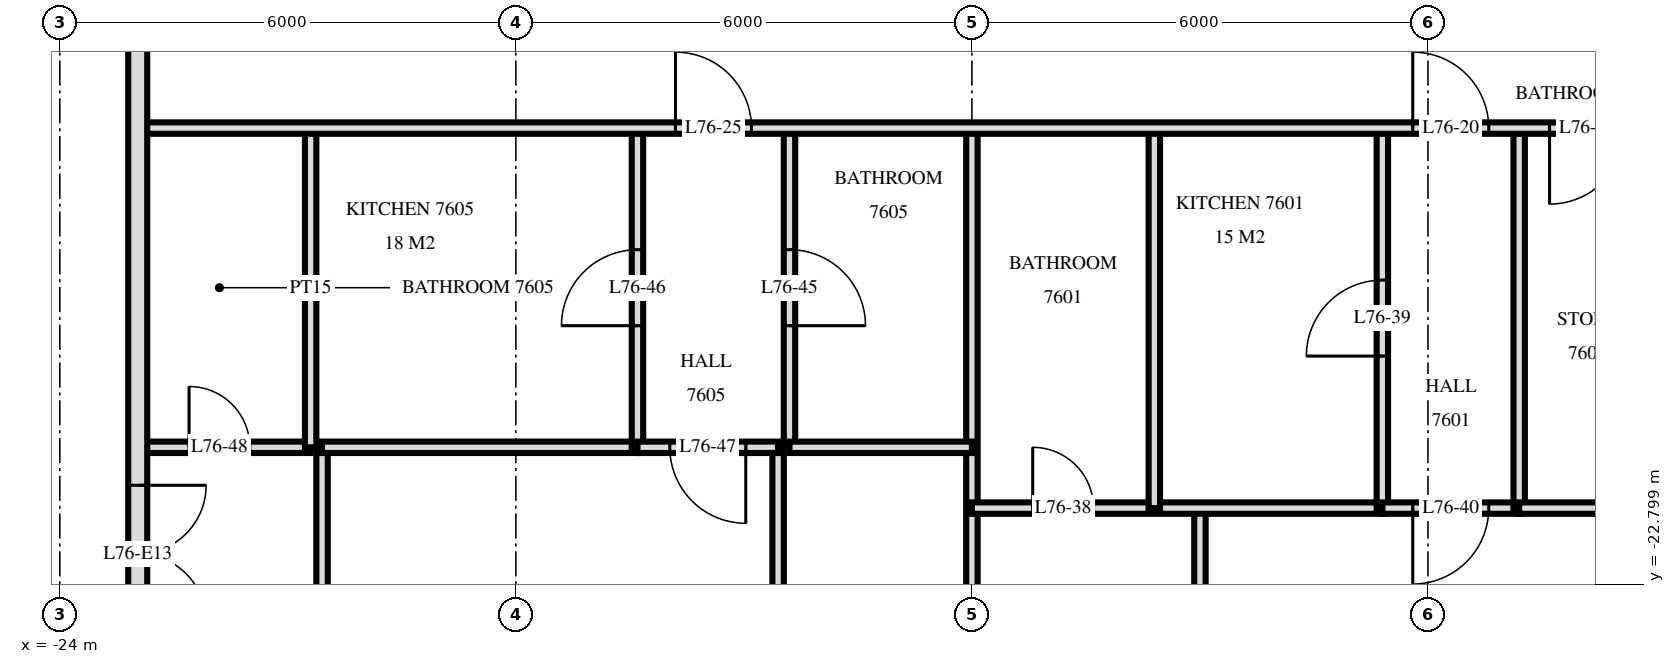
"""IFC4 building model, lengths in metres.
Left out: names, types, materials, properties, quantities, classifications, styles, units other than length and angle.
Written with IfcOpenShell. Run it as: python <this file> out.ifc"""

import sys

from ifc_helpers import new_model, si_unit, direction, frame, frame_2d, origin, place, context, subcontext, project, spatial, rectangle, extrude, element, fill, save


model = new_model("IFC4")
c1 = context("Model", 3, precision=1e-05, world=origin(), true_north=direction((0.0, 1.0)))
c2 = subcontext(c1, "Body", "Model", "MODEL_VIEW")
j1 = project(units=[si_unit("LENGTHUNIT", "METRE"), si_unit("PLANEANGLEUNIT", "RADIAN")], contexts=[c1])
p1 = place(None, origin())
s1 = spatial("IfcSite", under=j1, at=p1, CompositionType="ELEMENT")
p2 = place(p1, origin())
s2 = spatial("IfcBuilding", under=s1, at=p2, CompositionType="ELEMENT")
p3 = place(p2, frame((0.0, 0.0, 287.6)))
s3 = spatial("IfcBuildingStorey", under=s2, at=p3, CompositionType="ELEMENT", Elevation=287.6)
p4 = place(p3, frame((-22.975, -3.325, 0.0), z_axis=(0.0, 0.0, 1.0), x_axis=(0.0, -1.0, 0.0)))
e1 = element("IfcWall", 1, at=p4, inside=s3, PredefinedType="SOLIDWALL", context=c2, shape_type="SweptSolid", body=[
    extrude(rectangle(XDim=25.951, YDim=0.25, at=frame_2d((12.975, 0.0))), origin(), (0.0, 0.0, 1.0), 3.22),
])
p5 = place(p4, frame((1.475, 0.0, 0.0)))
e2 = element("IfcOpeningElement", 2, at=p5, cuts=e1, PredefinedType="OPENING", context=c2, shape_type="SweptSolid", body=[
    extrude(rectangle(XDim=1.8, YDim=2.4, at=frame_2d((0.9, 1.2))), frame((0.0, 0.135, 0.0), z_axis=(0.0, -1.0, 0.0), x_axis=(1.0, 0.0, 0.0)), (0.0, 0.0, 1.0), 0.27),
])
p6 = place(p4, frame((7.975, 0.0, 0.0)))
e3 = element("IfcOpeningElement", 3, at=p6, cuts=e1, PredefinedType="OPENING", context=c2, shape_type="SweptSolid", body=[
    extrude(rectangle(XDim=1.8, YDim=2.4, at=frame_2d((0.9, 1.2))), frame((0.0, 0.135, 0.0), z_axis=(0.0, -1.0, 0.0), x_axis=(1.0, 0.0, 0.0)), (0.0, 0.0, 1.0), 0.27),
])
p7 = place(p4, frame((18.175, 0.0, 0.0)))
e4 = element("IfcOpeningElement", 4, at=p7, cuts=e1, PredefinedType="OPENING", context=c2, shape_type="SweptSolid", body=[
    extrude(rectangle(XDim=1.8, YDim=2.4, at=frame_2d((0.9, 1.2))), frame((0.0, 0.135, 0.0), z_axis=(0.0, -1.0, 0.0), x_axis=(1.0, 0.0, 0.0)), (0.0, 0.0, 1.0), 0.27),
])
p8 = place(p4, frame((21.075, 0.0, 0.0)))
e5 = element("IfcOpeningElement", 5, at=p8, cuts=e1, PredefinedType="OPENING", context=c2, shape_type="SweptSolid", body=[
    extrude(rectangle(XDim=1.8, YDim=2.4, at=frame_2d((0.9, 1.2))), frame((0.0, 0.135, 0.0), z_axis=(0.0, -1.0, 0.0), x_axis=(1.0, 0.0, 0.0)), (0.0, 0.0, 1.0), 0.27),
])
p9 = place(p4, frame((23.825, 0.0, 0.9)))
e6 = element("IfcOpeningElement", 6, at=p9, cuts=e1, PredefinedType="OPENING", context=c2, shape_type="SweptSolid", body=[
    extrude(rectangle(XDim=1.8, YDim=1.5, at=frame_2d((0.9, 0.75))), frame((0.0, 0.135, 0.0), z_axis=(0.0, -1.0, 0.0), x_axis=(1.0, 0.0, 0.0)), (0.0, 0.0, 1.0), 0.27),
])
p10 = place(p3, frame((-4.8, -21.8, 0.0), z_axis=(0.0, 0.0, 1.0), x_axis=(0.0, 1.0, 0.0)))
e7 = element("IfcWall", 7, at=p10, inside=s3, PredefinedType="PARTITIONING", context=c2, shape_type="SweptSolid", body=[
    extrude(rectangle(XDim=5.0, YDim=0.15, at=frame_2d((2.5, 0.0))), origin(), (0.0, 0.0, 1.0), 3.22),
])
p11 = place(p3, frame((-6.6, -21.8, 0.0), z_axis=(0.0, 0.0, 1.0), x_axis=(0.0, 1.0, 0.0)))
e8 = element("IfcWall", 8, at=p11, inside=s3, PredefinedType="PARTITIONING", context=c2, shape_type="SweptSolid", body=[
    extrude(rectangle(XDim=5.0, YDim=0.15, at=frame_2d((2.5, 0.0))), origin(), (0.0, 0.0, 1.0), 3.22),
])
p12 = place(p11, frame((2.0, 0.0, 0.0)))
e9 = element("IfcOpeningElement", 9, at=p12, cuts=e8, PredefinedType="OPENING", context=c2, shape_type="SweptSolid", body=[
    extrude(rectangle(XDim=1.0, YDim=2.1, at=frame_2d((0.5, 1.05))), frame((0.0, 0.085, 0.0), z_axis=(0.0, -1.0, 0.0), x_axis=(1.0, 0.0, 0.0)), (0.0, 0.0, 1.0), 0.17),
])
p13 = place(p3, frame((-9.0, -33.62, 0.0), z_axis=(0.0, 0.0, 1.0), x_axis=(0.0, 1.0, 0.0)))
e10 = element("IfcWall", 10, at=p13, inside=s3, PredefinedType="PARTITIONING", context=c2, shape_type="SweptSolid", body=[
    extrude(rectangle(XDim=11.82, YDim=0.15, at=frame_2d((5.91, 0.0))), origin(), (0.0, 0.0, 1.0), 3.22),
])
p14 = place(p13, frame((5.37, 0.0, 0.0)))
e11 = element("IfcOpeningElement", 11, at=p14, cuts=e10, PredefinedType="OPENING", context=c2, shape_type="SweptSolid", body=[
    extrude(rectangle(XDim=0.9, YDim=2.1, at=frame_2d((0.45, 1.05))), frame((0.0, 0.085, 0.0), z_axis=(0.0, -1.0, 0.0), x_axis=(1.0, 0.0, 0.0)), (0.0, 0.0, 1.0), 0.17),
])
p15 = place(p3, frame((-9.6, -21.8, 0.0), z_axis=(0.0, 0.0, 1.0), x_axis=(0.0, 1.0, 0.0)))
e12 = element("IfcWall", 12, at=p15, inside=s3, PredefinedType="PARTITIONING", context=c2, shape_type="SweptSolid", body=[
    extrude(rectangle(XDim=5.0, YDim=0.15, at=frame_2d((2.5, 0.0))), origin(), (0.0, 0.0, 1.0), 3.22),
])
p16 = place(p3, frame((-12.0, -33.62, 0.0), z_axis=(0.0, 0.0, 1.0), x_axis=(0.0, 1.0, 0.0)))
e13 = element("IfcWall", 13, at=p16, inside=s3, PredefinedType="PARTITIONING", context=c2, shape_type="SweptSolid", body=[
    extrude(rectangle(XDim=16.82, YDim=0.15, at=frame_2d((8.41, 0.0))), origin(), (0.0, 0.0, 1.0), 3.22),
])
p17 = place(p3, frame((-14.4, -21.0, 0.0), z_axis=(0.0, 0.0, 1.0), x_axis=(0.0, 1.0, 0.0)))
e14 = element("IfcWall", 14, at=p17, inside=s3, PredefinedType="PARTITIONING", context=c2, shape_type="SweptSolid", body=[
    extrude(rectangle(XDim=4.2, YDim=0.15, at=frame_2d((2.1, 0.0))), origin(), (0.0, 0.0, 1.0), 3.22),
])
p18 = place(p17, frame((1.6, 0.0, 0.0)))
e15 = element("IfcOpeningElement", 15, at=p18, cuts=e14, PredefinedType="OPENING", context=c2, shape_type="SweptSolid", body=[
    extrude(rectangle(XDim=1.0, YDim=2.1, at=frame_2d((0.5, 1.05))), frame((0.0, 0.085, 0.0), z_axis=(0.0, -1.0, 0.0), x_axis=(1.0, 0.0, 0.0)), (0.0, 0.0, 1.0), 0.17),
])
p19 = place(p3, frame((-14.55, -33.62, 0.0), z_axis=(0.0, 0.0, 1.0), x_axis=(0.0, 1.0, 0.0)))
e16 = element("IfcWall", 16, at=p19, inside=s3, PredefinedType="PARTITIONING", context=c2, shape_type="SweptSolid", body=[
    extrude(rectangle(XDim=12.62, YDim=0.15, at=frame_2d((6.31, 0.0))), origin(), (0.0, 0.0, 1.0), 3.22),
])
p20 = place(p19, frame((5.77, 0.0, 0.0)))
e17 = element("IfcOpeningElement", 17, at=p20, cuts=e16, PredefinedType="OPENING", context=c2, shape_type="SweptSolid", body=[
    extrude(rectangle(XDim=0.9, YDim=2.1, at=frame_2d((0.45, 1.05))), frame((0.0, 0.085, 0.0), z_axis=(0.0, -1.0, 0.0), x_axis=(1.0, 0.0, 0.0)), (0.0, 0.0, 1.0), 0.17),
])
p21 = place(p3, frame((-16.4, -21.0, 0.0), z_axis=(0.0, 0.0, 1.0), x_axis=(0.0, 1.0, 0.0)))
e18 = element("IfcWall", 18, at=p21, inside=s3, PredefinedType="PARTITIONING", context=c2, shape_type="SweptSolid", body=[
    extrude(rectangle(XDim=4.2, YDim=0.15, at=frame_2d((2.1, 0.0))), origin(), (0.0, 0.0, 1.0), 3.22),
])
p22 = place(p21, frame((1.6, 0.0, 0.0)))
e19 = element("IfcOpeningElement", 19, at=p22, cuts=e18, PredefinedType="OPENING", context=c2, shape_type="SweptSolid", body=[
    extrude(rectangle(XDim=1.0, YDim=2.1, at=frame_2d((0.5, 1.05))), frame((0.0, 0.085, 0.0), z_axis=(0.0, -1.0, 0.0), x_axis=(1.0, 0.0, 0.0)), (0.0, 0.0, 1.0), 0.17),
])
p23 = place(p3, frame((-20.55, -33.017, 0.0), z_axis=(0.0, 0.0, 1.0), x_axis=(0.0, 1.0, 0.0)))
e20 = element("IfcWall", 20, at=p23, inside=s3, PredefinedType="PARTITIONING", context=c2, shape_type="SweptSolid", body=[
    extrude(rectangle(XDim=12.017, YDim=0.15, at=frame_2d((6.008, 0.0))), origin(), (0.0, 0.0, 1.0), 3.22),
])
p24 = place(p23, frame((5.432, 0.0, 0.0)))
e21 = element("IfcOpeningElement", 21, at=p24, cuts=e20, PredefinedType="OPENING", context=c2, shape_type="SweptSolid", body=[
    extrude(rectangle(XDim=0.9, YDim=2.1, at=frame_2d((0.45, 1.05))), frame((0.0, 0.085, 0.0), z_axis=(0.0, -1.0, 0.0), x_axis=(1.0, 0.0, 0.0)), (0.0, 0.0, 1.0), 0.17),
])
p25 = place(p3, frame((-20.7, -21.0, 0.0), z_axis=(0.0, 0.0, 1.0), x_axis=(0.0, 1.0, 0.0)))
e22 = element("IfcWall", 22, at=p25, inside=s3, PredefinedType="PARTITIONING", context=c2, shape_type="SweptSolid", body=[
    extrude(rectangle(XDim=4.2, YDim=0.15, at=frame_2d((2.1, 0.0))), origin(), (0.0, 0.0, 1.0), 3.22),
])
p26 = place(p3, frame((-6.6, -21.8, 0.0), z_axis=(0.0, 0.0, 1.0), x_axis=(1.0, 0.0, 0.0)))
e23 = element("IfcWall", 23, at=p26, inside=s3, PredefinedType="PARTITIONING", context=c2, shape_type="SweptSolid", body=[
    extrude(rectangle(XDim=1.8, YDim=0.15, at=frame_2d((0.9, 0.0))), origin(), (0.0, 0.0, 1.0), 3.22),
])
p27 = place(p26, frame((0.4, 0.0, 0.0)))
e24 = element("IfcOpeningElement", 24, at=p27, cuts=e23, PredefinedType="OPENING", context=c2, shape_type="SweptSolid", body=[
    extrude(rectangle(XDim=1.0, YDim=2.1, at=frame_2d((0.5, 1.05))), frame((0.0, 0.085, 0.0), z_axis=(0.0, -1.0, 0.0), x_axis=(1.0, 0.0, 0.0)), (0.0, 0.0, 1.0), 0.17),
])
p28 = place(p3, frame((-12.0, -21.8, 0.0), z_axis=(0.0, 0.0, 1.0), x_axis=(1.0, 0.0, 0.0)))
e25 = element("IfcWall", 25, at=p28, inside=s3, PredefinedType="PARTITIONING", context=c2, shape_type="SweptSolid", body=[
    extrude(rectangle(XDim=5.4, YDim=0.15, at=frame_2d((2.7, 0.0))), origin(), (0.0, 0.0, 1.0), 3.22),
])
p29 = place(p28, frame((0.8, 0.0, 0.0)))
e26 = element("IfcOpeningElement", 26, at=p29, cuts=e25, PredefinedType="OPENING", context=c2, shape_type="SweptSolid", body=[
    extrude(rectangle(XDim=0.8, YDim=2.1, at=frame_2d((0.4, 1.05))), frame((0.0, 0.085, 0.0), z_axis=(0.0, -1.0, 0.0), x_axis=(1.0, 0.0, 0.0)), (0.0, 0.0, 1.0), 0.17),
])
p30 = place(p3, frame((-4.8, -21.8, 0.0), z_axis=(0.0, 0.0, 1.0), x_axis=(1.0, 0.0, 0.0)))
e27 = element("IfcWall", 27, at=p30, inside=s3, PredefinedType="PARTITIONING", context=c2, shape_type="SweptSolid", body=[
    extrude(rectangle(XDim=3.5, YDim=0.15, at=frame_2d((1.75, 0.0))), origin(), (0.0, 0.0, 1.0), 3.22),
])
p31 = place(p3, frame((-16.4, -21.0, 0.0), z_axis=(0.0, 0.0, 1.0), x_axis=(1.0, 0.0, 0.0)))
e28 = element("IfcWall", 28, at=p31, inside=s3, PredefinedType="PARTITIONING", context=c2, shape_type="SweptSolid", body=[
    extrude(rectangle(XDim=1.85, YDim=0.15, at=frame_2d((0.925, 0.0))), origin(), (0.0, 0.0, 1.0), 3.22),
])
p32 = place(p31, frame((0.425, 0.0, 0.0)))
e29 = element("IfcOpeningElement", 29, at=p32, cuts=e28, PredefinedType="OPENING", context=c2, shape_type="SweptSolid", body=[
    extrude(rectangle(XDim=1.0, YDim=2.1, at=frame_2d((0.5, 1.05))), frame((0.0, 0.085, 0.0), z_axis=(0.0, -1.0, 0.0), x_axis=(1.0, 0.0, 0.0)), (0.0, 0.0, 1.0), 0.17),
])
p33 = place(p3, frame((-22.92, -21.0, 0.0), z_axis=(0.0, 0.0, 1.0), x_axis=(1.0, 0.0, 0.0)))
e30 = element("IfcWall", 30, at=p33, inside=s3, PredefinedType="PARTITIONING", context=c2, shape_type="SweptSolid", body=[
    extrude(rectangle(XDim=2.22, YDim=0.15, at=frame_2d((1.11, 0.0))), origin(), (0.0, 0.0, 1.0), 3.22),
])
p34 = place(p33, frame((0.62, 0.0, 0.0)))
e31 = element("IfcOpeningElement", 31, at=p34, cuts=e30, PredefinedType="OPENING", context=c2, shape_type="SweptSolid", body=[
    extrude(rectangle(XDim=0.8, YDim=2.1, at=frame_2d((0.4, 1.05))), frame((0.0, 0.085, 0.0), z_axis=(0.0, -1.0, 0.0), x_axis=(1.0, 0.0, 0.0)), (0.0, 0.0, 1.0), 0.17),
])
p35 = place(p3, frame((-20.55, -21.0, 0.0), z_axis=(0.0, 0.0, 1.0), x_axis=(1.0, 0.0, 0.0)))
e32 = element("IfcWall", 32, at=p35, inside=s3, PredefinedType="PARTITIONING", context=c2, shape_type="SweptSolid", body=[
    extrude(rectangle(XDim=4.15, YDim=0.15, at=frame_2d((2.075, 0.0))), origin(), (0.0, 0.0, 1.0), 3.22),
])
p36 = place(p3, frame((-14.4, -21.0, 0.0), z_axis=(0.0, 0.0, 1.0), x_axis=(1.0, 0.0, 0.0)))
e33 = element("IfcWall", 33, at=p36, inside=s3, PredefinedType="PARTITIONING", context=c2, shape_type="SweptSolid", body=[
    extrude(rectangle(XDim=2.4, YDim=0.15, at=frame_2d((1.2, 0.0))), origin(), (0.0, 0.0, 1.0), 3.22),
])
p37 = place(p3, frame((-22.92, -16.8, 0.0), z_axis=(0.0, 0.0, 1.0), x_axis=(1.0, 0.0, 0.0)))
e34 = element("IfcWall", 34, at=p37, inside=s3, PredefinedType="PARTITIONING", context=c2, shape_type="SweptSolid", body=[
    extrude(rectangle(XDim=45.84, YDim=0.15, at=frame_2d((22.92, 0.0))), origin(), (0.0, 0.0, 1.0), 3.22),
])
p38 = place(p37, frame((16.72, 0.0, 0.0)))
e35 = element("IfcOpeningElement", 35, at=p38, cuts=e34, PredefinedType="OPENING", context=c2, shape_type="SweptSolid", body=[
    extrude(rectangle(XDim=1.0, YDim=2.1, at=frame_2d((0.5, 1.05))), frame((0.0, 0.085, 0.0), z_axis=(0.0, -1.0, 0.0), x_axis=(1.0, 0.0, 0.0)), (0.0, 0.0, 1.0), 0.17),
])
p39 = place(p37, frame((18.52, 0.0, 0.0)))
e36 = element("IfcOpeningElement", 36, at=p39, cuts=e34, PredefinedType="OPENING", context=c2, shape_type="SweptSolid", body=[
    extrude(rectangle(XDim=1.0, YDim=2.1, at=frame_2d((0.5, 1.05))), frame((0.0, 0.085, 0.0), z_axis=(0.0, -1.0, 0.0), x_axis=(1.0, 0.0, 0.0)), (0.0, 0.0, 1.0), 0.17),
])
p40 = place(p37, frame((21.77, 0.0, 0.0)))
e37 = element("IfcOpeningElement", 37, at=p40, cuts=e34, PredefinedType="OPENING", context=c2, shape_type="SweptSolid", body=[
    extrude(rectangle(XDim=1.0, YDim=2.1, at=frame_2d((0.5, 1.05))), frame((0.0, 0.085, 0.0), z_axis=(0.0, -1.0, 0.0), x_axis=(1.0, 0.0, 0.0)), (0.0, 0.0, 1.0), 0.17),
])
p41 = place(p37, frame((23.07, 0.0, 0.0)))
e38 = element("IfcOpeningElement", 38, at=p41, cuts=e34, PredefinedType="OPENING", context=c2, shape_type="SweptSolid", body=[
    extrude(rectangle(XDim=1.0, YDim=2.1, at=frame_2d((0.5, 1.05))), frame((0.0, 0.085, 0.0), z_axis=(0.0, -1.0, 0.0), x_axis=(1.0, 0.0, 0.0)), (0.0, 0.0, 1.0), 0.17),
])
p42 = place(p37, frame((27.77, 0.0, 0.0)))
e39 = element("IfcOpeningElement", 39, at=p42, cuts=e34, PredefinedType="OPENING", context=c2, shape_type="SweptSolid", body=[
    extrude(rectangle(XDim=1.0, YDim=2.1, at=frame_2d((0.5, 1.05))), frame((0.0, 0.085, 0.0), z_axis=(0.0, -1.0, 0.0), x_axis=(1.0, 0.0, 0.0)), (0.0, 0.0, 1.0), 0.17),
])
p43 = place(p37, frame((7.02, 0.0, 0.0)))
e40 = element("IfcOpeningElement", 40, at=p43, cuts=e34, PredefinedType="OPENING", context=c2, shape_type="SweptSolid", body=[
    extrude(rectangle(XDim=1.0, YDim=2.1, at=frame_2d((0.5, 1.05))), frame((0.0, 0.085, 0.0), z_axis=(0.0, -1.0, 0.0), x_axis=(1.0, 0.0, 0.0)), (0.0, 0.0, 1.0), 0.17),
])
p44 = place(p37, frame((35.42, 0.0, 0.0)))
e41 = element("IfcOpeningElement", 41, at=p44, cuts=e34, PredefinedType="OPENING", context=c2, shape_type="SweptSolid", body=[
    extrude(rectangle(XDim=1.0, YDim=2.1, at=frame_2d((0.5, 1.05))), frame((0.0, 0.085, 0.0), z_axis=(0.0, -1.0, 0.0), x_axis=(1.0, 0.0, 0.0)), (0.0, 0.0, 1.0), 0.17),
])
p45 = place(p37, frame((42.19, 0.0, 0.0)))
e42 = element("IfcOpeningElement", 42, at=p45, cuts=e34, PredefinedType="OPENING", context=c2, shape_type="SweptSolid", body=[
    extrude(rectangle(XDim=1.0, YDim=2.1, at=frame_2d((0.5, 1.05))), frame((0.0, 0.085, 0.0), z_axis=(0.0, -1.0, 0.0), x_axis=(1.0, 0.0, 0.0)), (0.0, 0.0, 1.0), 0.17),
])
p46 = place(p7, origin())
e43 = element("IfcDoor", 43, at=p46, inside=s3, OperationType="DOUBLE_DOOR_SINGLE_SWING", PredefinedType="DOOR", context=c2, shape_type="SweptSolid", body=[
    extrude(rectangle(XDim=1.8, YDim=2.4, at=frame_2d((0.9, 1.2))), frame((0.0, 0.025, 0.0), z_axis=(0.0, -1.0, 0.0), x_axis=(1.0, 0.0, 0.0)), (0.0, 0.0, 1.0), 0.05),
])
fill(e4, e43)
p47 = place(p38, origin())
e44 = element("IfcDoor", 44, at=p47, inside=s3, OperationType="SINGLE_SWING_RIGHT", PredefinedType="DOOR", context=c2, shape_type="SweptSolid", body=[
    extrude(rectangle(XDim=1.0, YDim=2.1, at=frame_2d((0.5, 1.05))), frame((0.0, 0.025, 0.0), z_axis=(0.0, -1.0, 0.0), x_axis=(1.0, 0.0, 0.0)), (0.0, 0.0, 1.0), 0.05),
])
fill(e35, e44)
p48 = place(p39, frame((0.5, 0.0, 0.0), z_axis=(0.0, 0.0, 1.0), x_axis=(-1.0, 0.0, 0.0)))
e45 = element("IfcDoor", 45, at=p48, inside=s3, OperationType="SINGLE_SWING_LEFT", PredefinedType="DOOR", context=c2, shape_type="SweptSolid", body=[
    extrude(rectangle(XDim=1.0, YDim=2.1, at=frame_2d((0.0, 1.05))), frame((0.0, -0.025, 0.0), z_axis=(0.0, 1.0, 0.0), x_axis=(-1.0, 0.0, 0.0)), (0.0, 0.0, 1.0), 0.05),
])
fill(e36, e45)
p49 = place(p43, origin())
e46 = element("IfcDoor", 46, at=p49, inside=s3, OperationType="SINGLE_SWING_RIGHT", PredefinedType="DOOR", context=c2, shape_type="SweptSolid", body=[
    extrude(rectangle(XDim=1.0, YDim=2.1, at=frame_2d((0.5, 1.05))), frame((0.0, 0.025, 0.0), z_axis=(0.0, -1.0, 0.0), x_axis=(1.0, 0.0, 0.0)), (0.0, 0.0, 1.0), 0.05),
])
fill(e40, e46)
p50 = place(p29, origin())
e47 = element("IfcDoor", 47, at=p50, inside=s3, OperationType="SINGLE_SWING_RIGHT", PredefinedType="DOOR", context=c2, shape_type="SweptSolid", body=[
    extrude(rectangle(XDim=0.8, YDim=2.1, at=frame_2d((0.4, 1.05))), frame((0.0, 0.025, 0.0), z_axis=(0.0, -1.0, 0.0), x_axis=(1.0, 0.0, 0.0)), (0.0, 0.0, 1.0), 0.05),
])
fill(e26, e47)
p51 = place(p12, origin())
e48 = element("IfcDoor", 48, at=p51, inside=s3, OperationType="SINGLE_SWING_RIGHT", PredefinedType="DOOR", context=c2, shape_type="SweptSolid", body=[
    extrude(rectangle(XDim=1.0, YDim=2.1, at=frame_2d((0.5, 1.05))), frame((0.0, 0.025, 0.0), z_axis=(0.0, -1.0, 0.0), x_axis=(1.0, 0.0, 0.0)), (0.0, 0.0, 1.0), 0.05),
])
fill(e9, e48)
p52 = place(p27, frame((0.5, 0.0, 0.0), z_axis=(0.0, 0.0, 1.0), x_axis=(-1.0, 0.0, 0.0)))
e49 = element("IfcDoor", 49, at=p52, inside=s3, OperationType="SINGLE_SWING_LEFT", PredefinedType="DOOR", context=c2, shape_type="SweptSolid", body=[
    extrude(rectangle(XDim=1.0, YDim=2.1, at=frame_2d((0.0, 1.05))), frame((0.0, -0.025, 0.0), z_axis=(0.0, 1.0, 0.0), x_axis=(-1.0, 0.0, 0.0)), (0.0, 0.0, 1.0), 0.05),
])
fill(e24, e49)
p53 = place(p18, frame((0.5, 0.0, 0.0), z_axis=(0.0, 0.0, 1.0), x_axis=(-1.0, 0.0, 0.0)))
e50 = element("IfcDoor", 50, at=p53, inside=s3, OperationType="SINGLE_SWING_LEFT", PredefinedType="DOOR", context=c2, shape_type="SweptSolid", body=[
    extrude(rectangle(XDim=1.0, YDim=2.1, at=frame_2d((0.0, 1.05))), frame((0.0, -0.025, 0.0), z_axis=(0.0, 1.0, 0.0), x_axis=(-1.0, 0.0, 0.0)), (0.0, 0.0, 1.0), 0.05),
])
fill(e15, e50)
p54 = place(p22, origin())
e51 = element("IfcDoor", 51, at=p54, inside=s3, OperationType="SINGLE_SWING_RIGHT", PredefinedType="DOOR", context=c2, shape_type="SweptSolid", body=[
    extrude(rectangle(XDim=1.0, YDim=2.1, at=frame_2d((0.5, 1.05))), frame((0.0, 0.025, 0.0), z_axis=(0.0, -1.0, 0.0), x_axis=(1.0, 0.0, 0.0)), (0.0, 0.0, 1.0), 0.05),
])
fill(e19, e51)
p55 = place(p32, frame((0.5, 0.0, 0.0), z_axis=(0.0, 0.0, 1.0), x_axis=(-1.0, 0.0, 0.0)))
e52 = element("IfcDoor", 52, at=p55, inside=s3, OperationType="SINGLE_SWING_RIGHT", PredefinedType="DOOR", context=c2, shape_type="SweptSolid", body=[
    extrude(rectangle(XDim=1.0, YDim=2.1, at=frame_2d((0.0, 1.05))), frame((0.0, -0.025, 0.0), z_axis=(0.0, 1.0, 0.0), x_axis=(-1.0, 0.0, 0.0)), (0.0, 0.0, 1.0), 0.05),
])
fill(e29, e52)
p56 = place(p34, origin())
e53 = element("IfcDoor", 53, at=p56, inside=s3, OperationType="SINGLE_SWING_RIGHT", PredefinedType="DOOR", context=c2, shape_type="SweptSolid", body=[
    extrude(rectangle(XDim=0.8, YDim=2.1, at=frame_2d((0.4, 1.05))), frame((0.0, 0.025, 0.0), z_axis=(0.0, -1.0, 0.0), x_axis=(1.0, 0.0, 0.0)), (0.0, 0.0, 1.0), 0.05),
])
fill(e31, e53)
save(model, sys.argv[1])
